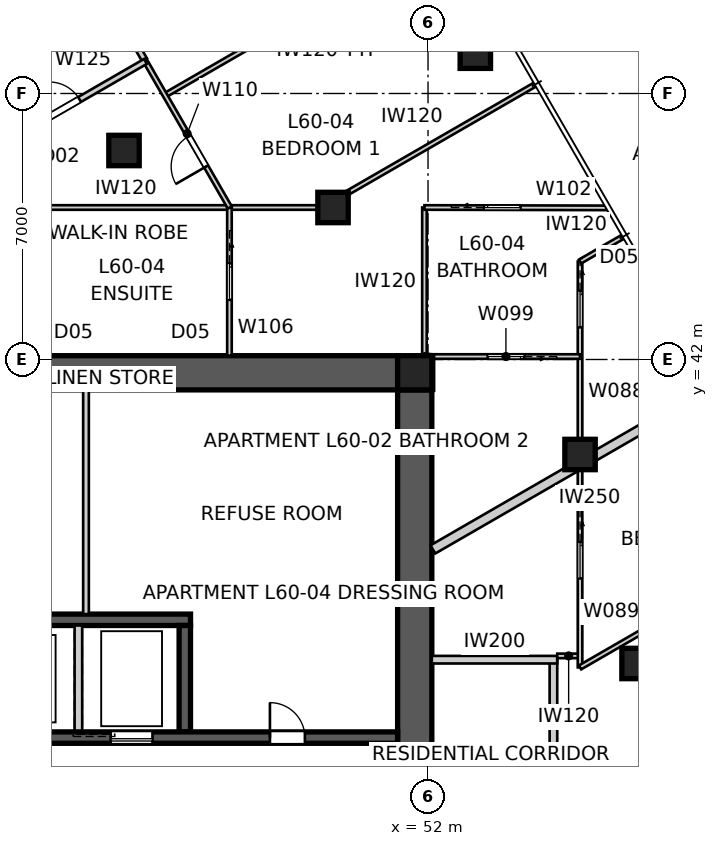
"""IFC4 building model, lengths in metres.
Left out: names, types, materials, properties, quantities, classifications, styles, units other than length and angle.
Written with IfcOpenShell. Run it as: python <this file> out.ifc"""

import sys

from ifc_helpers import new_model, si_unit, direction, frame, frame_2d, origin, origin_2d, place, context, subcontext, project, spatial, polyline, rectangle, outline, extrude, element, fill, save


model = new_model("IFC4")
c1 = context("Model", 3, precision=1e-05, world=origin(), true_north=direction((0.0, 1.0)))
c2 = subcontext(c1, "Body", "Model", "MODEL_VIEW")
j1 = project(units=[si_unit("LENGTHUNIT", "METRE"), si_unit("PLANEANGLEUNIT", "RADIAN")], contexts=[c1])
p1 = place(None, origin())
s1 = spatial("IfcSite", under=j1, at=p1, CompositionType="ELEMENT")
p2 = place(p1, origin())
s2 = spatial("IfcBuilding", under=s1, at=p2, CompositionType="ELEMENT")
p3 = place(p2, frame((0.0, 0.0, 218.4)))
s3 = spatial("IfcBuildingStorey", under=s2, at=p3, CompositionType="ELEMENT", Elevation=218.4)
p4 = place(p3, frame((28.8, 41.65, 0.0), z_axis=(0.0, 0.0, 1.0), x_axis=(1.0, 0.0, 0.0)))
e1 = element("IfcWall", 1, at=p4, inside=s3, PredefinedType="SHEAR", context=c2, shape_type="SweptSolid", body=[
    extrude(outline(polyline([(0.0, -0.45), (22.4, -0.45), (22.4, -0.025), (22.85, -0.025), (22.85, 0.025), (22.4, 0.025), (22.4, 0.45), (0.0, 0.45), (0.0, 0.025), (-0.45, 0.025), (-0.45, -0.025), (0.0, -0.025), (0.0, -0.45)])), origin(), (0.0, 0.0, 1.0), 3.4),
])
p5 = place(p3, frame((51.65, 18.8, 0.0), z_axis=(0.0, 0.0, 1.0), x_axis=(0.0, 1.0, 0.0)))
e2 = element("IfcWall", 2, at=p5, inside=s3, PredefinedType="SHEAR", context=c2, shape_type="SweptSolid", body=[
    extrude(outline(polyline([(0.0, -0.45), (22.4, -0.45), (22.4, -0.025), (22.85, -0.025), (22.85, 0.025), (22.4, 0.025), (22.4, 0.45), (0.0, 0.45), (0.0, 0.025), (-0.45, 0.025), (-0.45, -0.025), (0.0, -0.025), (0.0, -0.45)])), origin(), (0.0, 0.0, 1.0), 3.4),
])
p6 = place(p5, frame((11.14, 0.0, 0.0)))
e3 = element("IfcOpeningElement", 3, at=p6, cuts=e2, PredefinedType="OPENING", context=c2, shape_type="SweptSolid", body=[
    extrude(rectangle(XDim=1.02, YDim=2.4, at=frame_2d((0.51, 1.2))), frame((0.0, 0.46, 0.0), z_axis=(0.0, -1.0, 0.0), x_axis=(1.0, 0.0, 0.0)), (0.0, 0.0, 1.0), 0.92),
])
p7 = place(p3, frame((28.8, 32.05, 0.0), z_axis=(0.0, 0.0, 1.0), x_axis=(1.0, 0.0, 0.0)))
e4 = element("IfcWall", 4, at=p7, inside=s3, PredefinedType="SHEAR", context=c2, shape_type="SweptSolid", body=[
    extrude(rectangle(XDim=22.4, YDim=0.3, at=frame_2d((11.2, 0.0))), origin(), (0.0, 0.0, 1.0), 3.4),
])
p8 = place(p7, frame((19.04, 0.0, 0.0)))
e5 = element("IfcOpeningElement", 5, at=p8, cuts=e4, PredefinedType="OPENING", context=c2, shape_type="SweptSolid", body=[
    extrude(rectangle(XDim=0.92, YDim=2.1, at=frame_2d((0.46, 1.05))), frame((0.0, 0.16, 0.0), z_axis=(0.0, -1.0, 0.0), x_axis=(1.0, 0.0, 0.0)), (0.0, 0.0, 1.0), 0.32),
])
p9 = place(p7, frame((1.265, 0.0, 0.0)))
e6 = element("IfcOpeningElement", 6, at=p9, cuts=e4, PredefinedType="OPENING", context=c2, shape_type="SweptSolid", body=[
    extrude(rectangle(XDim=1.02, YDim=2.1, at=frame_2d((0.51, 1.05))), frame((0.0, 0.16, 0.0), z_axis=(0.0, -1.0, 0.0), x_axis=(1.0, 0.0, 0.0)), (0.0, 0.0, 1.0), 0.32),
])
p10 = place(p7, frame((4.015, 0.0, 0.0)))
e7 = element("IfcOpeningElement", 7, at=p10, cuts=e4, PredefinedType="OPENING", context=c2, shape_type="SweptSolid", body=[
    extrude(rectangle(XDim=0.92, YDim=2.1, at=frame_2d((0.46, 1.05))), frame((0.0, 0.16, 0.0), z_axis=(0.0, -1.0, 0.0), x_axis=(1.0, 0.0, 0.0)), (0.0, 0.0, 1.0), 0.32),
])
p11 = place(p7, frame((6.565, 0.0, 0.0)))
e8 = element("IfcOpeningElement", 8, at=p11, cuts=e4, PredefinedType="OPENING", context=c2, shape_type="SweptSolid", body=[
    extrude(rectangle(XDim=0.92, YDim=2.1, at=frame_2d((0.46, 1.05))), frame((0.0, 0.16, 0.0), z_axis=(0.0, -1.0, 0.0), x_axis=(1.0, 0.0, 0.0)), (0.0, 0.0, 1.0), 0.32),
])
p12 = place(p7, frame((8.89, 0.0, 0.0)))
e9 = element("IfcOpeningElement", 9, at=p12, cuts=e4, PredefinedType="OPENING", context=c2, shape_type="SweptSolid", body=[
    extrude(rectangle(XDim=0.92, YDim=2.1, at=frame_2d((0.46, 1.05))), frame((0.0, 0.16, 0.0), z_axis=(0.0, -1.0, 0.0), x_axis=(1.0, 0.0, 0.0)), (0.0, 0.0, 1.0), 0.32),
])
p13 = place(p7, frame((12.05, 0.0, 0.0)))
e10 = element("IfcOpeningElement", 10, at=p13, cuts=e4, PredefinedType="OPENING", context=c2, shape_type="SweptSolid", body=[
    extrude(rectangle(XDim=1.1, YDim=2.1, at=frame_2d((0.55, 1.05))), frame((0.0, 0.16, 0.0), z_axis=(0.0, -1.0, 0.0), x_axis=(1.0, 0.0, 0.0)), (0.0, 0.0, 1.0), 0.32),
])
p14 = place(p7, frame((14.85, 0.0, 0.0)))
e11 = element("IfcOpeningElement", 11, at=p14, cuts=e4, PredefinedType="OPENING", context=c2, shape_type="SweptSolid", body=[
    extrude(rectangle(XDim=1.1, YDim=2.1, at=frame_2d((0.55, 1.05))), frame((0.0, 0.16, 0.0), z_axis=(0.0, -1.0, 0.0), x_axis=(1.0, 0.0, 0.0)), (0.0, 0.0, 1.0), 0.32),
])
p15 = place(p3, frame((34.25, 35.15, 0.0), z_axis=(0.0, 0.0, 1.0), x_axis=(1.0, 0.0, 0.0)))
e12 = element("IfcWall", 12, at=p15, inside=s3, PredefinedType="SHEAR", context=c2, shape_type="SweptSolid", body=[
    extrude(rectangle(XDim=11.5, YDim=0.3, at=frame_2d((5.75, 0.0))), origin(), (0.0, 0.0, 1.0), 3.4),
])
p16 = place(p3, frame((42.8, 32.2, 0.0), z_axis=(0.0, 0.0, 1.0), x_axis=(0.0, 1.0, 0.0)))
e13 = element("IfcWall", 13, at=p16, inside=s3, PredefinedType="SOLIDWALL", context=c2, shape_type="SweptSolid", body=[
    extrude(rectangle(XDim=2.8, YDim=0.2, at=frame_2d((1.4, 0.0))), origin(), (0.0, 0.0, 1.0), 3.4),
])
p17 = place(p3, frame((45.6, 32.2, 0.0), z_axis=(0.0, 0.0, 1.0), x_axis=(0.0, 1.0, 0.0)))
e14 = element("IfcWall", 14, at=p17, inside=s3, PredefinedType="SHEAR", context=c2, shape_type="SweptSolid", body=[
    extrude(rectangle(XDim=2.8, YDim=0.3, at=frame_2d((1.4, 0.0))), origin(), (0.0, 0.0, 1.0), 3.4),
])
p18 = place(p3, frame((51.65, 41.65, 0.0), z_axis=(0.0, 0.0, 1.0), x_axis=(1.0, 0.0, 0.0)))
e15 = element("IfcColumn", 15, at=p18, inside=s3, PredefinedType="COLUMN", context=c2, shape_type="SweptSolid", body=[
    extrude(rectangle(XDim=0.9, YDim=0.9, at=origin_2d()), origin(), (0.0, 0.0, 1.0), 3.4),
])
for number, where, z_axis, x_axis in (
    (16, (53.245, 50.06, 0.0), (0.0, 0.0, 1.0), (1.0, 0.0, 0.0)),
    (17, (57.5, 34.0, 0.0), (0.0, 0.0, 1.0), (1.0, 0.0, 0.0)),
    (18, (56.0, 39.5, 0.0), (0.0, 0.0, 1.0), (1.0, 0.0, 0.0)),
    (19, (49.5, 46.0, 0.0), (0.0, 0.0, 1.0), (1.0, 0.0, 0.0)),
    (20, (44.0, 47.5, 0.0), (0.0, 0.0, 1.0), (1.0, 0.0, 0.0)),
):
    element("IfcColumn", number, at=place(p3, frame(where, z_axis=z_axis, x_axis=x_axis)), inside=s3, PredefinedType="COLUMN", context=c2, shape_type="SweptSolid", body=[
        extrude(rectangle(XDim=0.8, YDim=0.8, at=origin_2d()), origin(), (0.0, 0.0, 1.0), 3.4),
    ])
p19 = place(p3, frame((55.3, 25.9, 0.0), z_axis=(0.0, 0.0, 1.0), x_axis=(0.0, 1.0, 0.0)))
e21 = element("IfcWall", 21, at=p19, inside=s3, PredefinedType="PARTITIONING", context=c2, shape_type="SweptSolid", body=[
    extrude(rectangle(XDim=8.2, YDim=0.2, at=frame_2d((4.1, 0.0))), origin(), (0.0, 0.0, 1.0), 3.25),
])
p20 = place(p3, frame((52.1, 34.1, 0.0), z_axis=(0.0, 0.0, 1.0), x_axis=(1.0, 0.0, 0.0)))
e22 = element("IfcWall", 22, at=p20, inside=s3, PredefinedType="PARTITIONING", context=c2, shape_type="SweptSolid", body=[
    extrude(rectangle(XDim=3.3, YDim=0.2, at=frame_2d((1.65, 0.0))), origin(), (0.0, 0.0, 1.0), 3.25),
])
p21 = place(p3, frame((59.486, 41.25, 0.0), z_axis=(0.0, 0.0, 1.0), x_axis=(-0.866020489494, -0.500008511703, 0.0)))
e23 = element("IfcWall", 23, at=p21, inside=s3, PredefinedType="PARTITIONING", context=c2, shape_type="SweptSolid", body=[
    extrude(rectangle(XDim=8.496, YDim=0.25, at=frame_2d((4.248, 0.0))), origin(), (0.0, 0.0, 1.0), 3.25),
])
p22 = place(p3, frame((64.111, 33.239, 0.0), z_axis=(0.0, 0.0, 1.0), x_axis=(-0.866024190901, -0.50000210077, 0.0)))
e24 = element("IfcWall", 24, at=p22, inside=s3, PredefinedType="PARTITIONING", context=c2, shape_type="SweptSolid", body=[
    extrude(rectangle(XDim=10.026, YDim=0.25, at=frame_2d((5.013, 0.0))), origin(), (0.0, 0.0, 1.0), 3.25),
])
p23 = place(p22, frame((2.229, 0.0, 0.0)))
e25 = element("IfcOpeningElement", 25, at=p23, cuts=e24, PredefinedType="OPENING", context=c2, shape_type="SweptSolid", body=[
    extrude(rectangle(XDim=0.92, YDim=2.34, at=frame_2d((0.46, 1.17))), frame((0.0, 0.135, 0.0), z_axis=(0.0, -1.0, 0.0), x_axis=(1.0, 0.0, 0.0)), (0.0, 0.0, 1.0), 0.27),
])
p24 = place(p3, frame((43.0, 41.2, 0.0), z_axis=(0.0, 0.0, 1.0), x_axis=(0.0, -1.0, 0.0)))
e26 = element("IfcWall", 26, at=p24, inside=s3, PredefinedType="SOLIDWALL", context=c2, shape_type="SweptSolid", body=[
    extrude(rectangle(XDim=5.9, YDim=0.15, at=frame_2d((2.95, 0.0))), origin(), (0.0, 0.0, 1.0), 3.25),
])
p25 = place(p3, frame((56.0, 34.2, 0.0), z_axis=(0.0, 0.0, 1.0), x_axis=(-1.0, 0.0, 0.0)))
e27 = element("IfcWall", 27, at=p25, inside=s3, PredefinedType="PARTITIONING", context=c2, shape_type="SweptSolid", body=[
    extrude(rectangle(XDim=0.6, YDim=0.12, at=frame_2d((0.3, 0.0))), origin(), (0.0, 0.0, 1.0), 3.25),
])
p26 = place(p3, frame((56.0, 44.578, 0.0), z_axis=(0.0, 0.0, 1.0), x_axis=(0.0, -1.0, 0.0)))
e28 = element("IfcWall", 28, at=p26, inside=s3, PredefinedType="PARTITIONING", context=c2, shape_type="SweptSolid", body=[
    extrude(rectangle(XDim=10.681, YDim=0.12, at=frame_2d((5.34, 0.0))), origin(), (0.0, 0.0, 1.0), 2.55),
])
p27 = place(p26, frame((0.77, 0.0, 0.0)))
e29 = element("IfcOpeningElement", 29, at=p27, cuts=e28, PredefinedType="OPENING", context=c2, shape_type="SweptSolid", body=[
    extrude(rectangle(XDim=0.96, YDim=2.1, at=frame_2d((0.48, 1.05))), frame((0.0, 0.07, 0.0), z_axis=(0.0, -1.0, 0.0), x_axis=(1.0, 0.0, 0.0)), (0.0, 0.0, 1.0), 0.14),
])
p28 = place(p26, frame((7.379, 0.0, 0.0)))
e30 = element("IfcOpeningElement", 30, at=p28, cuts=e28, PredefinedType="OPENING", context=c2, shape_type="SweptSolid", body=[
    extrude(rectangle(XDim=0.96, YDim=2.1, at=frame_2d((0.48, 1.05))), frame((0.0, 0.07, 0.0), z_axis=(0.0, -1.0, 0.0), x_axis=(1.0, 0.0, 0.0)), (0.0, 0.0, 1.0), 0.14),
])
p29 = place(p3, frame((56.0, 33.897, 0.0), z_axis=(0.0, 0.0, 1.0), x_axis=(0.866033470286, 0.49998602815, 0.0)))
e31 = element("IfcWall", 31, at=p29, inside=s3, PredefinedType="PARTITIONING", context=c2, shape_type="SweptSolid", body=[
    extrude(rectangle(XDim=6.655, YDim=0.12, at=frame_2d((3.328, 0.0))), origin(), (0.0, 0.0, 1.0), 3.25),
])
p30 = place(p29, frame((2.887, 0.0, 0.0)))
e32 = element("IfcOpeningElement", 32, at=p30, cuts=e31, PredefinedType="OPENING", context=c2, shape_type="SweptSolid", body=[
    extrude(rectangle(XDim=0.92, YDim=2.34, at=frame_2d((0.46, 1.17))), frame((0.0, 0.07, 0.0), z_axis=(0.0, -1.0, 0.0), x_axis=(1.0, 0.0, 0.0)), (0.0, 0.0, 1.0), 0.14),
])
p31 = place(p3, frame((32.0, 46.0, 0.0), z_axis=(0.0, 0.0, 1.0), x_axis=(1.0, 0.0, 0.0)))
e33 = element("IfcWall", 33, at=p31, inside=s3, PredefinedType="PARTITIONING", context=c2, shape_type="SweptSolid", body=[
    extrude(rectangle(XDim=17.213, YDim=0.12, at=frame_2d((8.607, 0.0))), origin(), (0.0, 0.0, 1.0), 3.25),
])
p32 = place(p3, frame((56.0, 42.078, 0.0), z_axis=(0.0, 0.0, 1.0), x_axis=(-1.0, 0.0, 0.0)))
e34 = element("IfcWall", 34, at=p32, inside=s3, PredefinedType="PARTITIONING", context=c2, shape_type="SweptSolid", body=[
    extrude(rectangle(XDim=3.9, YDim=0.12, at=frame_2d((1.95, 0.0))), origin(), (0.0, 0.0, 1.0), 3.25),
])
p33 = place(p32, frame((1.47, 0.0, 0.0)))
e35 = element("IfcOpeningElement", 35, at=p33, cuts=e34, PredefinedType="OPENING", context=c2, shape_type="SweptSolid", body=[
    extrude(rectangle(XDim=0.96, YDim=2.1, at=frame_2d((0.48, 1.05))), frame((0.0, 0.07, 0.0), z_axis=(0.0, -1.0, 0.0), x_axis=(1.0, 0.0, 0.0)), (0.0, 0.0, 1.0), 0.14),
])
p34 = place(p3, frame((51.906, 42.1, 0.0), z_axis=(0.0, 0.0, 1.0), x_axis=(0.0, 1.0, 0.0)))
e36 = element("IfcWall", 36, at=p34, inside=s3, PredefinedType="PARTITIONING", context=c2, shape_type="SweptSolid", body=[
    extrude(rectangle(XDim=3.9, YDim=0.12, at=frame_2d((1.95, 0.0))), origin(), (0.0, 0.0, 1.0), 3.25),
])
p35 = place(p3, frame((51.906, 46.0, 0.0), z_axis=(0.0, 0.0, 1.0), x_axis=(0.999997822794, -0.002086721841, 0.0)))
e37 = element("IfcWall", 37, at=p35, inside=s3, PredefinedType="PARTITIONING", context=c2, shape_type="SweptSolid", body=[
    extrude(rectangle(XDim=4.797, YDim=0.12, at=frame_2d((2.398, 0.0))), origin(), (0.0, 0.0, 1.0), 3.25),
])
p36 = place(p35, frame((1.567, 0.0, 0.0)))
e38 = element("IfcOpeningElement", 38, at=p36, cuts=e37, PredefinedType="OPENING", context=c2, shape_type="SweptSolid", body=[
    extrude(rectangle(XDim=0.96, YDim=2.1, at=frame_2d((0.48, 1.05))), frame((0.0, 0.07, 0.0), z_axis=(0.0, -1.0, 0.0), x_axis=(1.0, 0.0, 0.0)), (0.0, 0.0, 1.0), 0.14),
])
p37 = place(p3, frame((57.138, 45.235, 0.0), z_axis=(0.0, 0.0, 1.0), x_axis=(-0.866040225545, -0.499974327079, 0.0)))
e39 = element("IfcWall", 39, at=p37, inside=s3, PredefinedType="PARTITIONING", context=c2, shape_type="SweptSolid", body=[
    extrude(rectangle(XDim=1.314, YDim=0.12, at=frame_2d((0.657, 0.0))), origin(), (0.0, 0.0, 1.0), 3.25),
])
p38 = place(p3, frame((52.1, 41.18, 0.0), z_axis=(0.0, 0.0, 1.0), x_axis=(0.0, 1.0, 0.0)))
e40 = element("IfcWall", 40, at=p38, inside=s3, PredefinedType="PARTITIONING", context=c2, shape_type="SweptSolid", body=[
    extrude(rectangle(XDim=0.898, YDim=0.12, at=frame_2d((0.449, 0.0))), origin(), (0.0, 0.0, 1.0), 3.25),
])
p39 = place(p3, frame((46.775, 46.0, 0.0), z_axis=(0.0, 0.0, 1.0), x_axis=(0.0, -1.0, 0.0)))
e41 = element("IfcWall", 41, at=p39, inside=s3, PredefinedType="PARTITIONING", context=c2, shape_type="SweptSolid", body=[
    extrude(rectangle(XDim=3.9, YDim=0.12, at=frame_2d((1.95, 0.0))), origin(), (0.0, 0.0, 1.0), 3.25),
])
p40 = place(p39, frame((1.47, 0.0, 0.0)))
e42 = element("IfcOpeningElement", 42, at=p40, cuts=e41, PredefinedType="OPENING", context=c2, shape_type="SweptSolid", body=[
    extrude(rectangle(XDim=0.96, YDim=2.1, at=frame_2d((0.48, 1.05))), frame((0.0, 0.07, 0.0), z_axis=(0.0, -1.0, 0.0), x_axis=(1.0, 0.0, 0.0)), (0.0, 0.0, 1.0), 0.14),
])
p41 = place(p3, frame((45.079, 48.954, 0.0), z_axis=(0.0, 0.0, 1.0), x_axis=(0.866025991751, 0.49999898161, 0.0)))
e43 = element("IfcWall", 43, at=p41, inside=s3, PredefinedType="PARTITIONING", context=c2, shape_type="SweptSolid", body=[
    extrude(rectangle(XDim=8.585, YDim=0.12, at=frame_2d((4.292, 0.0))), origin(), (0.0, 0.0, 1.0), 3.25),
])
p42 = place(p3, frame((46.784, 46.0, 0.0), z_axis=(0.0, 0.0, 1.0), x_axis=(-0.500017500808, 0.866015299452, 0.0)))
e44 = element("IfcWall", 44, at=p42, inside=s3, PredefinedType="PARTITIONING", context=c2, shape_type="SweptSolid", body=[
    extrude(rectangle(XDim=4.489, YDim=0.12, at=frame_2d((2.244, 0.0))), origin(), (0.0, 0.0, 1.0), 3.25),
])
p43 = place(p42, frame((1.245, 0.0, 0.0)))
e45 = element("IfcOpeningElement", 45, at=p43, cuts=e44, PredefinedType="OPENING", context=c2, shape_type="SweptSolid", body=[
    extrude(rectangle(XDim=0.92, YDim=2.34, at=frame_2d((0.46, 1.17))), frame((0.0, 0.07, 0.0), z_axis=(0.0, -1.0, 0.0), x_axis=(1.0, 0.0, 0.0)), (0.0, 0.0, 1.0), 0.14),
])
p44 = place(p3, frame((54.826, 49.241, 0.0), z_axis=(0.0, 0.0, 1.0), x_axis=(-0.866023120914, -0.500003954026, 0.0)))
e46 = element("IfcWall", 46, at=p44, inside=s3, PredefinedType="PARTITIONING", context=c2, shape_type="SweptSolid", body=[
    extrude(rectangle(XDim=6.481, YDim=0.12, at=frame_2d((3.241, 0.0))), origin(), (0.0, 0.0, 1.0), 3.25),
])
p45 = place(p3, frame((44.54, 49.887, 0.0), z_axis=(0.0, 0.0, 1.0), x_axis=(-0.500005013853, 0.866022509016, 0.0)))
e47 = element("IfcWall", 47, at=p45, inside=s3, PredefinedType="SOLIDWALL", context=c2, shape_type="SweptSolid", body=[
    extrude(rectangle(XDim=2.119, YDim=0.15, at=frame_2d((1.06, 0.0))), origin(), (0.0, 0.0, 1.0), 3.25),
])
p46 = place(p3, frame((43.455, 51.766, 0.0), z_axis=(0.0, 0.0, 1.0), x_axis=(-0.866025598446, -0.499999662836, 0.0)))
e48 = element("IfcWall", 48, at=p46, inside=s3, PredefinedType="SOLIDWALL", context=c2, shape_type="SweptSolid", body=[
    extrude(rectangle(XDim=4.625, YDim=0.15, at=frame_2d((2.312, 0.0))), origin(), (0.0, 0.0, 1.0), 3.25),
])
p47 = place(p3, frame((40.559, 47.531, 0.0), z_axis=(0.0, 0.0, 1.0), x_axis=(0.866025598446, 0.499999662836, 0.0)))
e49 = element("IfcWall", 49, at=p47, inside=s3, PredefinedType="SOLIDWALL", context=c2, shape_type="SweptSolid", body=[
    extrude(rectangle(XDim=4.625, YDim=0.15, at=frame_2d((2.312, 0.0))), origin(), (0.0, 0.0, 1.0), 3.25),
])
p48 = place(p47, frame((1.702, 0.0, 0.0)))
e50 = element("IfcOpeningElement", 50, at=p48, cuts=e49, PredefinedType="OPENING", context=c2, shape_type="SweptSolid", body=[
    extrude(rectangle(XDim=0.92, YDim=2.34, at=frame_2d((0.46, 1.17))), frame((0.0, 0.085, 0.0), z_axis=(0.0, -1.0, 0.0), x_axis=(1.0, 0.0, 0.0)), (0.0, 0.0, 1.0), 0.17),
])
p49 = place(p3, frame((51.906, 42.1, 0.0), z_axis=(0.0, 0.0, 1.0), x_axis=(0.993387055489, -0.114813579278, 0.0)))
e51 = element("IfcWall", 51, at=p49, inside=s3, PredefinedType="PARTITIONING", context=c2, shape_type="SweptSolid", body=[
    extrude(rectangle(XDim=0.196, YDim=0.12, at=frame_2d((0.098, 0.0))), origin(), (0.0, 0.0, 1.0), 3.25),
])
p50 = place(p8, origin())
e52 = element("IfcDoor", 52, at=p50, inside=s3, OperationType="SINGLE_SWING_LEFT", PredefinedType="DOOR", context=c2, shape_type="SweptSolid", body=[
    extrude(rectangle(XDim=0.92, YDim=2.1, at=frame_2d((0.46, 1.05))), frame((0.0, 0.025, 0.0), z_axis=(0.0, -1.0, 0.0), x_axis=(1.0, 0.0, 0.0)), (0.0, 0.0, 1.0), 0.05),
])
fill(e5, e52)
p51 = place(p48, origin())
e53 = element("IfcDoor", 53, at=p51, inside=s3, OperationType="SINGLE_SWING_LEFT", PredefinedType="DOOR", context=c2, shape_type="SweptSolid", body=[
    extrude(rectangle(XDim=0.92, YDim=2.34, at=frame_2d((0.46, 1.17))), frame((0.0, 0.025, 0.0), z_axis=(0.0, -1.0, 0.0), x_axis=(1.0, 0.0, 0.0)), (0.0, 0.0, 1.0), 0.05),
])
fill(e50, e53)
p52 = place(p40, origin())
e54 = element("IfcDoor", 54, at=p52, inside=s3, OperationType="SLIDING_TO_LEFT", PredefinedType="DOOR", context=c2, shape_type="SweptSolid", body=[
    extrude(rectangle(XDim=0.96, YDim=2.1, at=frame_2d((0.48, 1.05))), frame((0.0, 0.025, 0.0), z_axis=(0.0, -1.0, 0.0), x_axis=(1.0, 0.0, 0.0)), (0.0, 0.0, 1.0), 0.05),
])
fill(e42, e54)
p53 = place(p43, origin())
e55 = element("IfcDoor", 55, at=p53, inside=s3, OperationType="SINGLE_SWING_LEFT", PredefinedType="DOOR", context=c2, shape_type="SweptSolid", body=[
    extrude(rectangle(XDim=0.92, YDim=2.34, at=frame_2d((0.46, 1.17))), frame((0.0, 0.025, 0.0), z_axis=(0.0, -1.0, 0.0), x_axis=(1.0, 0.0, 0.0)), (0.0, 0.0, 1.0), 0.05),
])
fill(e45, e55)
p54 = place(p36, origin())
e56 = element("IfcDoor", 56, at=p54, inside=s3, OperationType="SLIDING_TO_LEFT", PredefinedType="DOOR", context=c2, shape_type="SweptSolid", body=[
    extrude(rectangle(XDim=0.96, YDim=2.1, at=frame_2d((0.48, 1.05))), frame((0.0, 0.025, 0.0), z_axis=(0.0, -1.0, 0.0), x_axis=(1.0, 0.0, 0.0)), (0.0, 0.0, 1.0), 0.05),
])
fill(e38, e56)
p55 = place(p33, origin())
e57 = element("IfcDoor", 57, at=p55, inside=s3, OperationType="SLIDING_TO_LEFT", PredefinedType="DOOR", context=c2, shape_type="SweptSolid", body=[
    extrude(rectangle(XDim=0.96, YDim=2.1, at=frame_2d((0.48, 1.05))), frame((0.0, 0.025, 0.0), z_axis=(0.0, -1.0, 0.0), x_axis=(1.0, 0.0, 0.0)), (0.0, 0.0, 1.0), 0.05),
])
fill(e35, e57)
p56 = place(p27, origin())
e58 = element("IfcDoor", 58, at=p56, inside=s3, OperationType="SLIDING_TO_LEFT", PredefinedType="DOOR", context=c2, shape_type="SweptSolid", body=[
    extrude(rectangle(XDim=0.96, YDim=2.1, at=frame_2d((0.48, 1.05))), frame((0.0, 0.025, 0.0), z_axis=(0.0, -1.0, 0.0), x_axis=(1.0, 0.0, 0.0)), (0.0, 0.0, 1.0), 0.05),
])
fill(e29, e58)
p57 = place(p28, origin())
e59 = element("IfcDoor", 59, at=p57, inside=s3, OperationType="SLIDING_TO_LEFT", PredefinedType="DOOR", context=c2, shape_type="SweptSolid", body=[
    extrude(rectangle(XDim=0.96, YDim=2.1, at=frame_2d((0.48, 1.05))), frame((0.0, 0.025, 0.0), z_axis=(0.0, -1.0, 0.0), x_axis=(1.0, 0.0, 0.0)), (0.0, 0.0, 1.0), 0.05),
])
fill(e30, e59)
p58 = place(p14, origin())
e60 = element("IfcDoor", 60, at=p58, inside=s3, OperationType="SLIDING_TO_LEFT", PredefinedType="DOOR", context=c2, shape_type="SweptSolid", body=[
    extrude(rectangle(XDim=1.1, YDim=2.1, at=frame_2d((0.55, 1.05))), frame((0.0, 0.025, 0.0), z_axis=(0.0, -1.0, 0.0), x_axis=(1.0, 0.0, 0.0)), (0.0, 0.0, 1.0), 0.05),
])
fill(e11, e60)
save(model, sys.argv[1])
